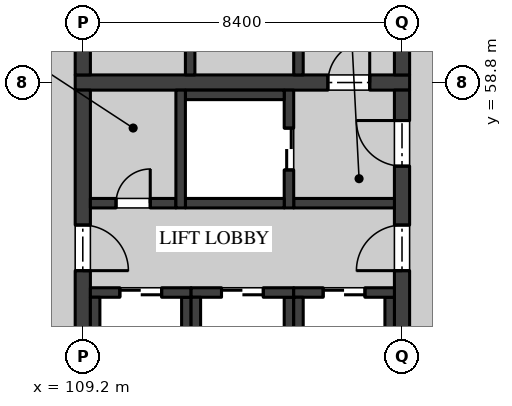
"""IFC4 building model, lengths in metres.
Left out: names, types, materials, properties, quantities, classifications, styles, units other than length and angle.
Written with IfcOpenShell. Run it as: python <this file> out.ifc"""

import sys

from ifc_helpers import new_model, si_unit, direction, frame, frame_2d, origin, place, context, subcontext, project, spatial, rectangle, extrude, element, fill, save


model = new_model("IFC4")
c1 = context("Model", 3, precision=1e-05, world=origin(), true_north=direction((0.0, 1.0)))
c2 = subcontext(c1, "Body", "Model", "MODEL_VIEW")
j1 = project(units=[si_unit("LENGTHUNIT", "METRE"), si_unit("PLANEANGLEUNIT", "RADIAN")], contexts=[c1])
p1 = place(None, origin())
s1 = spatial("IfcSite", under=j1, at=p1, CompositionType="ELEMENT")
p2 = place(p1, origin())
s2 = spatial("IfcBuilding", under=s1, at=p2, CompositionType="ELEMENT")
p3 = place(p2, frame((0.0, 0.0, 14.4)))
s3 = spatial("IfcBuildingStorey", under=s2, at=p3, CompositionType="ELEMENT", Elevation=14.4)
p4 = place(p3, frame((109.0, 58.8, 0.0), z_axis=(0.0, 0.0, 1.0), x_axis=(1.0, 0.0, 0.0)))
e1 = element("IfcWall", 1, at=p4, inside=s3, PredefinedType="SHEAR", context=c2, shape_type="SweptSolid", body=[
    extrude(rectangle(XDim=8.8, YDim=0.4, at=frame_2d((4.4, 0.0))), origin(), (0.0, 0.0, 1.0), 4.37),
])
p5 = place(p4, frame((6.65, 0.0, 0.0)))
e2 = element("IfcOpeningElement", 2, at=p5, cuts=e1, PredefinedType="OPENING", context=c2, shape_type="SweptSolid", body=[
    extrude(rectangle(XDim=1.1, YDim=2.1, at=frame_2d((0.55, 1.05))), frame((0.0, 0.21, 0.0), z_axis=(0.0, -1.0, 0.0), x_axis=(1.0, 0.0, 0.0)), (0.0, 0.0, 1.0), 0.42),
])
p6 = place(p3, frame((109.2, 50.6, 0.0), z_axis=(0.0, 0.0, 1.0), x_axis=(0.0, 1.0, 0.0)))
e3 = element("IfcWall", 3, at=p6, inside=s3, PredefinedType="SHEAR", context=c2, shape_type="SweptSolid", body=[
    extrude(rectangle(XDim=8.0, YDim=0.4, at=frame_2d((4.0, 0.0))), origin(), (0.0, 0.0, 1.0), 4.37),
])
p7 = place(p6, frame((3.25, 0.0, 0.0)))
e4 = element("IfcOpeningElement", 4, at=p7, cuts=e3, PredefinedType="OPENING", context=c2, shape_type="SweptSolid", body=[
    extrude(rectangle(XDim=1.2, YDim=2.1, at=frame_2d((0.6, 1.05))), frame((0.0, 0.21, 0.0), z_axis=(0.0, -1.0, 0.0), x_axis=(1.0, 0.0, 0.0)), (0.0, 0.0, 1.0), 0.42),
])
p8 = place(p3, frame((117.6, 50.6, 0.0), z_axis=(0.0, 0.0, 1.0), x_axis=(0.0, 1.0, 0.0)))
e5 = element("IfcWall", 5, at=p8, inside=s3, PredefinedType="SHEAR", context=c2, shape_type="SweptSolid", body=[
    extrude(rectangle(XDim=8.0, YDim=0.4, at=frame_2d((4.0, 0.0))), origin(), (0.0, 0.0, 1.0), 4.37),
])
p9 = place(p8, frame((3.25, 0.0, 0.0)))
e6 = element("IfcOpeningElement", 6, at=p9, cuts=e5, PredefinedType="OPENING", context=c2, shape_type="SweptSolid", body=[
    extrude(rectangle(XDim=1.2, YDim=2.1, at=frame_2d((0.6, 1.05))), frame((0.0, 0.21, 0.0), z_axis=(0.0, -1.0, 0.0), x_axis=(1.0, 0.0, 0.0)), (0.0, 0.0, 1.0), 0.42),
])
p10 = place(p8, frame((6.0, 0.0, 0.0)))
e7 = element("IfcOpeningElement", 7, at=p10, cuts=e5, PredefinedType="OPENING", context=c2, shape_type="SweptSolid", body=[
    extrude(rectangle(XDim=1.2, YDim=2.1, at=frame_2d((0.6, 1.05))), frame((0.0, 0.21, 0.0), z_axis=(0.0, -1.0, 0.0), x_axis=(1.0, 0.0, 0.0)), (0.0, 0.0, 1.0), 0.42),
])
p11 = place(p3, frame((109.4, 55.625, 0.0), z_axis=(0.0, 0.0, 1.0), x_axis=(1.0, 0.0, 0.0)))
e8 = element("IfcWall", 8, at=p11, inside=s3, PredefinedType="SOLIDWALL", context=c2, shape_type="SweptSolid", body=[
    extrude(rectangle(XDim=2.25, YDim=0.25, at=frame_2d((1.125, 0.0))), origin(), (0.0, 0.0, 1.0), 4.37),
])
p12 = place(p11, frame((0.675, 0.0, 0.0)))
e9 = element("IfcOpeningElement", 9, at=p12, cuts=e8, PredefinedType="OPENING", context=c2, shape_type="SweptSolid", body=[
    extrude(rectangle(XDim=0.9, YDim=2.1, at=frame_2d((0.45, 1.05))), frame((0.0, 0.135, 0.0), z_axis=(0.0, -1.0, 0.0), x_axis=(1.0, 0.0, 0.0)), (0.0, 0.0, 1.0), 0.27),
])
p13 = place(p3, frame((114.75, 55.625, 0.0), z_axis=(0.0, 0.0, 1.0), x_axis=(1.0, 0.0, 0.0)))
e10 = element("IfcWall", 10, at=p13, inside=s3, PredefinedType="SOLIDWALL", context=c2, shape_type="SweptSolid", body=[
    extrude(rectangle(XDim=2.65, YDim=0.25, at=frame_2d((1.325, 0.0))), origin(), (0.0, 0.0, 1.0), 4.37),
])
p14 = place(p3, frame((109.2, 59.0, 0.0), z_axis=(0.0, 0.0, 1.0), x_axis=(0.0, 1.0, 0.0)))
e11 = element("IfcWall", 11, at=p14, inside=s3, PredefinedType="SHEAR", context=c2, shape_type="SweptSolid", body=[
    extrude(rectangle(XDim=8.0, YDim=0.4, at=frame_2d((4.0, 0.0))), origin(), (0.0, 0.0, 1.0), 4.37),
])
p15 = place(p14, frame((2.925, 0.0, 0.0)))
e12 = element("IfcOpeningElement", 12, at=p15, cuts=e11, PredefinedType="OPENING", context=c2, shape_type="SweptSolid", body=[
    extrude(rectangle(XDim=1.2, YDim=2.1, at=frame_2d((0.6, 1.05))), frame((0.0, 0.21, 0.0), z_axis=(0.0, -1.0, 0.0), x_axis=(1.0, 0.0, 0.0)), (0.0, 0.0, 1.0), 0.42),
])
p16 = place(p3, frame((117.6, 59.0, 0.0), z_axis=(0.0, 0.0, 1.0), x_axis=(0.0, 1.0, 0.0)))
e13 = element("IfcWall", 13, at=p16, inside=s3, PredefinedType="SHEAR", context=c2, shape_type="SweptSolid", body=[
    extrude(rectangle(XDim=8.0, YDim=0.4, at=frame_2d((4.0, 0.0))), origin(), (0.0, 0.0, 1.0), 4.37),
])
p17 = place(p16, frame((2.925, 0.0, 0.0)))
e14 = element("IfcOpeningElement", 14, at=p17, cuts=e13, PredefinedType="OPENING", context=c2, shape_type="SweptSolid", body=[
    extrude(rectangle(XDim=1.2, YDim=2.1, at=frame_2d((0.6, 1.05))), frame((0.0, 0.21, 0.0), z_axis=(0.0, -1.0, 0.0), x_axis=(1.0, 0.0, 0.0)), (0.0, 0.0, 1.0), 0.42),
])
p18 = place(p3, frame((114.875, 61.8, 0.0), z_axis=(0.0, 0.0, 1.0), x_axis=(0.0, -1.0, 0.0)))
e15 = element("IfcWall", 15, at=p18, inside=s3, PredefinedType="SOLIDWALL", context=c2, shape_type="SweptSolid", body=[
    extrude(rectangle(XDim=2.8, YDim=0.25, at=frame_2d((1.4, 0.0))), origin(), (0.0, 0.0, 1.0), 4.37),
])
p19 = place(p3, frame((112.025, 61.55, 0.0), z_axis=(0.0, 0.0, 1.0), x_axis=(0.0, -1.0, 0.0)))
e16 = element("IfcWall", 16, at=p19, inside=s3, PredefinedType="SOLIDWALL", context=c2, shape_type="SweptSolid", body=[
    extrude(rectangle(XDim=2.55, YDim=0.25, at=frame_2d((1.275, 0.0))), origin(), (0.0, 0.0, 1.0), 4.37),
])
p20 = place(p3, frame((114.625, 55.5, 0.0), z_axis=(0.0, 0.0, 1.0), x_axis=(0.0, 1.0, 0.0)))
e17 = element("IfcWall", 17, at=p20, inside=s3, PredefinedType="SOLIDWALL", context=c2, shape_type="SweptSolid", body=[
    extrude(rectangle(XDim=3.1, YDim=0.25, at=frame_2d((1.55, 0.0))), origin(), (0.0, 0.0, 1.0), 4.37),
])
p21 = place(p20, frame((1.0, 0.0, 0.0)))
e18 = element("IfcOpeningElement", 18, at=p21, cuts=e17, PredefinedType="OPENING", context=c2, shape_type="SweptSolid", body=[
    extrude(rectangle(XDim=1.1, YDim=2.1, at=frame_2d((0.55, 1.05))), frame((0.0, 0.135, 0.0), z_axis=(0.0, -1.0, 0.0), x_axis=(1.0, 0.0, 0.0)), (0.0, 0.0, 1.0), 0.27),
])
for number, where, z_axis, x_axis in (
    (19, (111.9, 58.475, 0.0), (0.0, 0.0, 1.0), (1.0, 0.0, 0.0)),
    (20, (111.9, 55.625, 0.0), (0.0, 0.0, 1.0), (1.0, 0.0, 0.0)),
):
    element("IfcWall", number, at=place(p3, frame(where, z_axis=z_axis, x_axis=x_axis)), inside=s3, PredefinedType="SOLIDWALL", context=c2, shape_type="SweptSolid", body=[
        extrude(rectangle(XDim=2.6, YDim=0.25, at=frame_2d((1.3, 0.0))), origin(), (0.0, 0.0, 1.0), 4.37),
    ])
p22 = place(p3, frame((111.775, 55.5, 0.0), z_axis=(0.0, 0.0, 1.0), x_axis=(0.0, 1.0, 0.0)))
e21 = element("IfcWall", 21, at=p22, inside=s3, PredefinedType="SOLIDWALL", context=c2, shape_type="SweptSolid", body=[
    extrude(rectangle(XDim=3.1, YDim=0.25, at=frame_2d((1.55, 0.0))), origin(), (0.0, 0.0, 1.0), 4.37),
])
p23 = place(p3, frame((111.925, 50.85, 0.0), z_axis=(0.0, 0.0, 1.0), x_axis=(0.0, 1.0, 0.0)))
e22 = element("IfcWall", 22, at=p23, inside=s3, PredefinedType="SOLIDWALL", context=c2, shape_type="SweptSolid", body=[
    extrude(rectangle(XDim=2.3, YDim=0.25, at=frame_2d((1.15, 0.0))), origin(), (0.0, 0.0, 1.0), 4.37),
])
p24 = place(p3, frame((109.4, 53.275, 0.0), z_axis=(0.0, 0.0, 1.0), x_axis=(1.0, 0.0, 0.0)))
e23 = element("IfcWall", 23, at=p24, inside=s3, PredefinedType="SOLIDWALL", context=c2, shape_type="SweptSolid", body=[
    extrude(rectangle(XDim=2.65, YDim=0.25, at=frame_2d((1.325, 0.0))), origin(), (0.0, 0.0, 1.0), 4.37),
])
p25 = place(p24, frame((0.775, 0.0, 0.0)))
e24 = element("IfcOpeningElement", 24, at=p25, cuts=e23, PredefinedType="OPENING", context=c2, shape_type="SweptSolid", body=[
    extrude(rectangle(XDim=1.1, YDim=2.1, at=frame_2d((0.55, 1.05))), frame((0.0, 0.135, 0.0), z_axis=(0.0, -1.0, 0.0), x_axis=(1.0, 0.0, 0.0)), (0.0, 0.0, 1.0), 0.27),
])
for number, where, z_axis, x_axis in (
    (25, (109.525, 50.85, 0.0), (0.0, 0.0, 1.0), (0.0, 1.0, 0.0)),
    (26, (114.625, 50.85, 0.0), (0.0, 0.0, 1.0), (0.0, 1.0, 0.0)),
):
    element("IfcWall", number, at=place(p3, frame(where, z_axis=z_axis, x_axis=x_axis)), inside=s3, PredefinedType="SOLIDWALL", context=c2, shape_type="SweptSolid", body=[
        extrude(rectangle(XDim=2.3, YDim=0.25, at=frame_2d((1.15, 0.0))), origin(), (0.0, 0.0, 1.0), 4.37),
    ])
p26 = place(p3, frame((112.05, 53.275, 0.0), z_axis=(0.0, 0.0, 1.0), x_axis=(1.0, 0.0, 0.0)))
e27 = element("IfcWall", 27, at=p26, inside=s3, PredefinedType="SOLIDWALL", context=c2, shape_type="SweptSolid", body=[
    extrude(rectangle(XDim=2.7, YDim=0.25, at=frame_2d((1.35, 0.0))), origin(), (0.0, 0.0, 1.0), 4.37),
])
p27 = place(p26, frame((0.8, 0.0, 0.0)))
e28 = element("IfcOpeningElement", 28, at=p27, cuts=e27, PredefinedType="OPENING", context=c2, shape_type="SweptSolid", body=[
    extrude(rectangle(XDim=1.1, YDim=2.1, at=frame_2d((0.55, 1.05))), frame((0.0, 0.135, 0.0), z_axis=(0.0, -1.0, 0.0), x_axis=(1.0, 0.0, 0.0)), (0.0, 0.0, 1.0), 0.27),
])
for number, where, z_axis, x_axis in (
    (29, (112.175, 50.85, 0.0), (0.0, 0.0, 1.0), (0.0, 1.0, 0.0)),
    (30, (117.275, 50.85, 0.0), (0.0, 0.0, 1.0), (0.0, 1.0, 0.0)),
):
    element("IfcWall", number, at=place(p3, frame(where, z_axis=z_axis, x_axis=x_axis)), inside=s3, PredefinedType="SOLIDWALL", context=c2, shape_type="SweptSolid", body=[
        extrude(rectangle(XDim=2.3, YDim=0.25, at=frame_2d((1.15, 0.0))), origin(), (0.0, 0.0, 1.0), 4.37),
    ])
p28 = place(p3, frame((114.75, 53.275, 0.0), z_axis=(0.0, 0.0, 1.0), x_axis=(1.0, 0.0, 0.0)))
e31 = element("IfcWall", 31, at=p28, inside=s3, PredefinedType="SOLIDWALL", context=c2, shape_type="SweptSolid", body=[
    extrude(rectangle(XDim=2.65, YDim=0.25, at=frame_2d((1.325, 0.0))), origin(), (0.0, 0.0, 1.0), 4.37),
])
p29 = place(p28, frame((0.775, 0.0, 0.0)))
e32 = element("IfcOpeningElement", 32, at=p29, cuts=e31, PredefinedType="OPENING", context=c2, shape_type="SweptSolid", body=[
    extrude(rectangle(XDim=1.1, YDim=2.1, at=frame_2d((0.55, 1.05))), frame((0.0, 0.135, 0.0), z_axis=(0.0, -1.0, 0.0), x_axis=(1.0, 0.0, 0.0)), (0.0, 0.0, 1.0), 0.27),
])
p30 = place(p3, frame((114.875, 50.85, 0.0), z_axis=(0.0, 0.0, 1.0), x_axis=(0.0, 1.0, 0.0)))
e33 = element("IfcWall", 33, at=p30, inside=s3, PredefinedType="SOLIDWALL", context=c2, shape_type="SweptSolid", body=[
    extrude(rectangle(XDim=2.3, YDim=0.25, at=frame_2d((1.15, 0.0))), origin(), (0.0, 0.0, 1.0), 4.37),
])
p31 = place(p7, frame((1.2, 0.0, 0.0), z_axis=(0.0, 0.0, 1.0), x_axis=(-1.0, 0.0, 0.0)))
e34 = element("IfcDoor", 34, at=p31, inside=s3, OperationType="SINGLE_SWING_LEFT", PredefinedType="DOOR", context=c2, shape_type="SweptSolid", body=[
    extrude(rectangle(XDim=1.2, YDim=2.1, at=frame_2d((0.6, 1.05))), frame((0.0, 0.035, 0.0), z_axis=(0.0, -1.0, 0.0), x_axis=(1.0, 0.0, 0.0)), (0.0, 0.0, 1.0), 0.07),
])
fill(e4, e34)
p32 = place(p9, origin())
e35 = element("IfcDoor", 35, at=p32, inside=s3, OperationType="SINGLE_SWING_RIGHT", PredefinedType="DOOR", context=c2, shape_type="SweptSolid", body=[
    extrude(rectangle(XDim=1.2, YDim=2.1, at=frame_2d((0.6, 1.05))), frame((0.0, 0.035, 0.0), z_axis=(0.0, -1.0, 0.0), x_axis=(1.0, 0.0, 0.0)), (0.0, 0.0, 1.0), 0.07),
])
fill(e6, e35)
p33 = place(p10, origin())
e36 = element("IfcDoor", 36, at=p33, inside=s3, OperationType="SINGLE_SWING_LEFT", PredefinedType="DOOR", context=c2, shape_type="SweptSolid", body=[
    extrude(rectangle(XDim=1.2, YDim=2.1, at=frame_2d((0.6, 1.05))), frame((0.0, 0.035, 0.0), z_axis=(0.0, -1.0, 0.0), x_axis=(1.0, 0.0, 0.0)), (0.0, 0.0, 1.0), 0.07),
])
fill(e7, e36)
p34 = place(p5, origin())
e37 = element("IfcDoor", 37, at=p34, inside=s3, OperationType="SINGLE_SWING_LEFT", PredefinedType="DOOR", context=c2, shape_type="SweptSolid", body=[
    extrude(rectangle(XDim=1.1, YDim=2.1, at=frame_2d((0.55, 1.05))), frame((0.0, 0.035, 0.0), z_axis=(0.0, -1.0, 0.0), x_axis=(1.0, 0.0, 0.0)), (0.0, 0.0, 1.0), 0.07),
])
fill(e2, e37)
p35 = place(p12, origin())
e38 = element("IfcDoor", 38, at=p35, inside=s3, OperationType="SINGLE_SWING_LEFT", PredefinedType="DOOR", context=c2, shape_type="SweptSolid", body=[
    extrude(rectangle(XDim=0.9, YDim=2.1, at=frame_2d((0.45, 1.05))), frame((0.0, 0.05, 0.0), z_axis=(0.0, -1.0, 0.0), x_axis=(1.0, 0.0, 0.0)), (0.0, 0.0, 1.0), 0.1),
])
fill(e9, e38)
p36 = place(p21, origin())
e39 = element("IfcDoor", 39, at=p36, inside=s3, OperationType="DOUBLE_DOOR_SLIDING", PredefinedType="DOOR", context=c2, shape_type="SweptSolid", body=[
    extrude(rectangle(XDim=1.1, YDim=2.1, at=frame_2d((0.55, 1.05))), frame((0.0, 0.04, 0.0), z_axis=(0.0, -1.0, 0.0), x_axis=(1.0, 0.0, 0.0)), (0.0, 0.0, 1.0), 0.08),
])
fill(e18, e39)
p37 = place(p25, origin())
e40 = element("IfcDoor", 40, at=p37, inside=s3, OperationType="DOUBLE_DOOR_SLIDING", PredefinedType="DOOR", context=c2, shape_type="SweptSolid", body=[
    extrude(rectangle(XDim=1.1, YDim=2.1, at=frame_2d((0.55, 1.05))), frame((0.0, 0.04, 0.0), z_axis=(0.0, -1.0, 0.0), x_axis=(1.0, 0.0, 0.0)), (0.0, 0.0, 1.0), 0.08),
])
fill(e24, e40)
p38 = place(p27, origin())
e41 = element("IfcDoor", 41, at=p38, inside=s3, OperationType="DOUBLE_DOOR_SLIDING", PredefinedType="DOOR", context=c2, shape_type="SweptSolid", body=[
    extrude(rectangle(XDim=1.1, YDim=2.1, at=frame_2d((0.55, 1.05))), frame((0.0, 0.04, 0.0), z_axis=(0.0, -1.0, 0.0), x_axis=(1.0, 0.0, 0.0)), (0.0, 0.0, 1.0), 0.08),
])
fill(e28, e41)
p39 = place(p29, origin())
e42 = element("IfcDoor", 42, at=p39, inside=s3, OperationType="DOUBLE_DOOR_SLIDING", PredefinedType="DOOR", context=c2, shape_type="SweptSolid", body=[
    extrude(rectangle(XDim=1.1, YDim=2.1, at=frame_2d((0.55, 1.05))), frame((0.0, 0.04, 0.0), z_axis=(0.0, -1.0, 0.0), x_axis=(1.0, 0.0, 0.0)), (0.0, 0.0, 1.0), 0.08),
])
fill(e32, e42)
save(model, sys.argv[1])
